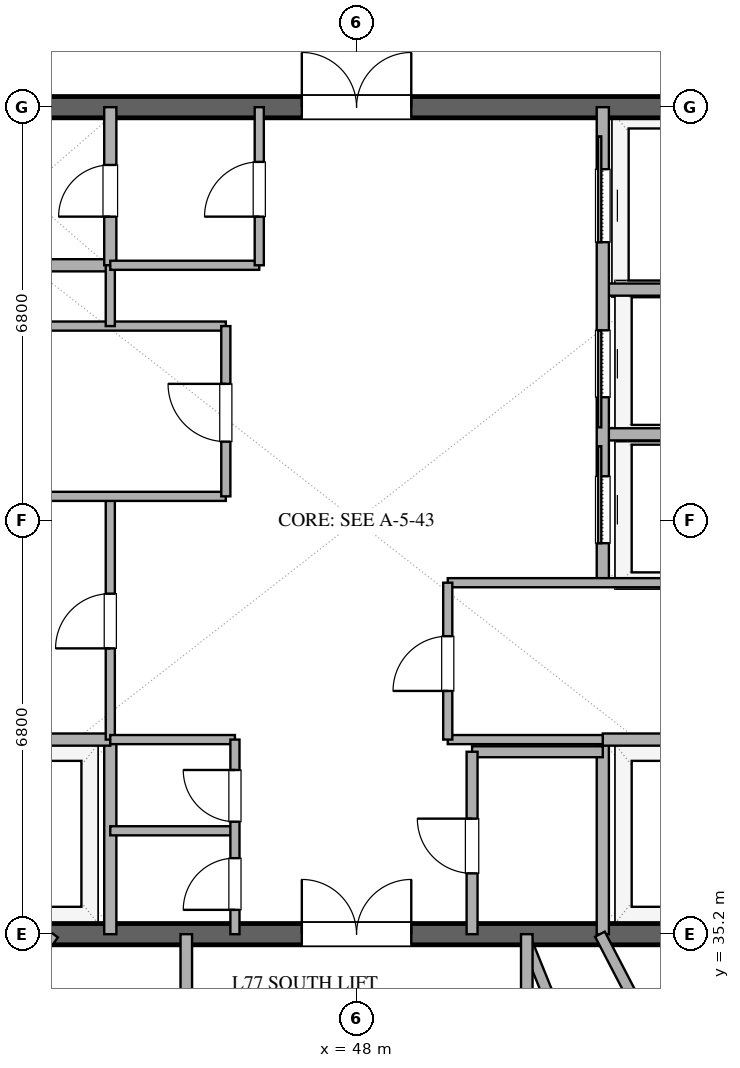
"""IFC4 building model, lengths in metres.
Left out: names, types, materials, properties, quantities, classifications, styles, units other than length and angle.
Written with IfcOpenShell. Run it as: python <this file> out.ifc"""

import sys

from ifc_helpers import new_model, si_unit, direction, frame, frame_2d, origin, place, context, subcontext, project, spatial, rectangle, extrude, element, fill, save


model = new_model("IFC4")
c1 = context("Model", 3, precision=1e-05, world=origin(), true_north=direction((0.0, 1.0)))
c2 = subcontext(c1, "Body", "Model", "MODEL_VIEW")
j1 = project(units=[si_unit("LENGTHUNIT", "METRE"), si_unit("PLANEANGLEUNIT", "RADIAN")], contexts=[c1])
p1 = place(None, origin())
s1 = spatial("IfcSite", under=j1, at=p1, CompositionType="ELEMENT")
p2 = place(p1, origin())
s2 = spatial("IfcBuilding", under=s1, at=p2, CompositionType="ELEMENT")
p3 = place(p2, frame((0.0, 0.0, 298.2)))
s3 = spatial("IfcBuildingStorey", under=s2, at=p3, CompositionType="ELEMENT", Elevation=298.2)
p4 = place(p3, frame((41.0, 35.2, 0.0), z_axis=(0.0, 0.0, 1.0), x_axis=(1.0, 0.0, 0.0)))
e1 = element("IfcWall", 1, at=p4, inside=s3, PredefinedType="SHEAR", context=c2, shape_type="SweptSolid", body=[
    extrude(rectangle(XDim=14.0, YDim=0.35, at=frame_2d((7.0, 0.0))), origin(), (0.0, 0.0, 1.0), 3.37),
])
p5 = place(p4, frame((6.1, 0.0, 0.0)))
e2 = element("IfcOpeningElement", 2, at=p5, cuts=e1, PredefinedType="OPENING", context=c2, shape_type="SweptSolid", body=[
    extrude(rectangle(XDim=1.8, YDim=2.25, at=frame_2d((0.9, 1.125))), frame((0.0, 0.185, 0.0), z_axis=(0.0, -1.0, 0.0), x_axis=(1.0, 0.0, 0.0)), (0.0, 0.0, 1.0), 0.37),
])
p6 = place(p3, frame((41.0, 48.8, 0.0), z_axis=(0.0, 0.0, 1.0), x_axis=(1.0, 0.0, 0.0)))
e3 = element("IfcWall", 3, at=p6, inside=s3, PredefinedType="SHEAR", context=c2, shape_type="SweptSolid", body=[
    extrude(rectangle(XDim=14.0, YDim=0.35, at=frame_2d((7.0, 0.0))), origin(), (0.0, 0.0, 1.0), 3.37),
])
p7 = place(p6, frame((6.1, 0.0, 0.0)))
e4 = element("IfcOpeningElement", 4, at=p7, cuts=e3, PredefinedType="OPENING", context=c2, shape_type="SweptSolid", body=[
    extrude(rectangle(XDim=1.8, YDim=2.25, at=frame_2d((0.9, 1.125))), frame((0.0, 0.185, 0.0), z_axis=(0.0, -1.0, 0.0), x_axis=(1.0, 0.0, 0.0)), (0.0, 0.0, 1.0), 0.37),
])
p8 = place(p3, frame((43.95, 35.2, 0.0), z_axis=(0.0, 0.0, 1.0), x_axis=(0.0, 1.0, 0.0)))
e5 = element("IfcWall", 5, at=p8, inside=s3, PredefinedType="SOLIDWALL", context=c2, shape_type="SweptSolid", body=[
    extrude(rectangle(XDim=3.2, YDim=0.2, at=frame_2d((1.6, 0.0))), origin(), (0.0, 0.0, 1.0), 2.73),
])
p9 = place(p3, frame((41.0, 38.4, 0.0), z_axis=(0.0, 0.0, 1.0), x_axis=(1.0, 0.0, 0.0)))
e6 = element("IfcWall", 6, at=p9, inside=s3, PredefinedType="SOLIDWALL", context=c2, shape_type="SweptSolid", body=[
    extrude(rectangle(XDim=2.95, YDim=0.2, at=frame_2d((1.475, 0.0))), origin(), (0.0, 0.0, 1.0), 2.73),
])
p10 = place(p3, frame((52.05, 35.2, 0.0), z_axis=(0.0, 0.0, 1.0), x_axis=(0.0, 1.0, 0.0)))
e7 = element("IfcWall", 7, at=p10, inside=s3, PredefinedType="SOLIDWALL", context=c2, shape_type="SweptSolid", body=[
    extrude(rectangle(XDim=3.2, YDim=0.2, at=frame_2d((1.6, 0.0))), origin(), (0.0, 0.0, 1.0), 2.73),
])
for number, where, z_axis, x_axis in (
    (8, (52.05, 38.4, 0.0), (0.0, 0.0, 1.0), (1.0, 0.0, 0.0)),
    (9, (41.0, 46.2, 0.0), (0.0, 0.0, 1.0), (1.0, 0.0, 0.0)),
):
    element("IfcWall", number, at=place(p3, frame(where, z_axis=z_axis, x_axis=x_axis)), inside=s3, PredefinedType="SOLIDWALL", context=c2, shape_type="SweptSolid", body=[
        extrude(rectangle(XDim=2.95, YDim=0.2, at=frame_2d((1.475, 0.0))), origin(), (0.0, 0.0, 1.0), 2.73),
    ])
p11 = place(p3, frame((43.95, 46.2, 0.0), z_axis=(0.0, 0.0, 1.0), x_axis=(0.0, 1.0, 0.0)))
e10 = element("IfcWall", 10, at=p11, inside=s3, PredefinedType="SOLIDWALL", context=c2, shape_type="SweptSolid", body=[
    extrude(rectangle(XDim=2.6, YDim=0.2, at=frame_2d((1.3, 0.0))), origin(), (0.0, 0.0, 1.0), 2.73),
])
p12 = place(p11, frame((0.8, 0.0, 0.0)))
e11 = element("IfcOpeningElement", 11, at=p12, cuts=e10, PredefinedType="OPENING", context=c2, shape_type="SweptSolid", body=[
    extrude(rectangle(XDim=0.85, YDim=2.15, at=frame_2d((0.425, 1.075))), frame((0.0, 0.11, 0.0), z_axis=(0.0, -1.0, 0.0), x_axis=(1.0, 0.0, 0.0)), (0.0, 0.0, 1.0), 0.22),
])
p13 = place(p3, frame((43.95, 38.4, 0.0), z_axis=(0.0, 0.0, 1.0), x_axis=(0.0, 1.0, 0.0)))
e12 = element("IfcWall", 12, at=p13, inside=s3, PredefinedType="PARTITIONING", context=c2, shape_type="SweptSolid", body=[
    extrude(rectangle(XDim=4.0, YDim=0.15, at=frame_2d((2.0, 0.0))), origin(), (0.0, 0.0, 1.0), 2.73),
])
p14 = place(p13, frame((1.5, 0.0, 0.0)))
e13 = element("IfcOpeningElement", 13, at=p14, cuts=e12, PredefinedType="OPENING", context=c2, shape_type="SweptSolid", body=[
    extrude(rectangle(XDim=0.9, YDim=2.15, at=frame_2d((0.45, 1.075))), frame((0.0, 0.085, 0.0), z_axis=(0.0, -1.0, 0.0), x_axis=(1.0, 0.0, 0.0)), (0.0, 0.0, 1.0), 0.17),
])
for number, where, z_axis, x_axis in (
    (14, (41.0, 42.4, 0.0), (0.0, 0.0, 1.0), (1.0, 0.0, 0.0)),
    (15, (41.0, 45.2, 0.0), (0.0, 0.0, 1.0), (1.0, 0.0, 0.0)),
):
    element("IfcWall", number, at=place(p3, frame(where, z_axis=z_axis, x_axis=x_axis)), inside=s3, PredefinedType="PARTITIONING", context=c2, shape_type="SweptSolid", body=[
        extrude(rectangle(XDim=4.85, YDim=0.15, at=frame_2d((2.425, 0.0))), origin(), (0.0, 0.0, 1.0), 2.73),
    ])
p15 = place(p3, frame((43.95, 45.2, 0.0), z_axis=(0.0, 0.0, 1.0), x_axis=(0.0, 1.0, 0.0)))
e16 = element("IfcWall", 16, at=p15, inside=s3, PredefinedType="PARTITIONING", context=c2, shape_type="SweptSolid", body=[
    extrude(rectangle(XDim=1.0, YDim=0.15, at=frame_2d((0.5, 0.0))), origin(), (0.0, 0.0, 1.0), 2.73),
])
p16 = place(p3, frame((45.85, 42.4, 0.0), z_axis=(0.0, 0.0, 1.0), x_axis=(0.0, 1.0, 0.0)))
e17 = element("IfcWall", 17, at=p16, inside=s3, PredefinedType="PARTITIONING", context=c2, shape_type="SweptSolid", body=[
    extrude(rectangle(XDim=2.8, YDim=0.15, at=frame_2d((1.4, 0.0))), origin(), (0.0, 0.0, 1.0), 2.73),
])
p17 = place(p16, frame((0.9, 0.0, 0.0)))
e18 = element("IfcOpeningElement", 18, at=p17, cuts=e17, PredefinedType="OPENING", context=c2, shape_type="SweptSolid", body=[
    extrude(rectangle(XDim=0.95, YDim=2.15, at=frame_2d((0.475, 1.075))), frame((0.0, 0.085, 0.0), z_axis=(0.0, -1.0, 0.0), x_axis=(1.0, 0.0, 0.0)), (0.0, 0.0, 1.0), 0.17),
])
for number, where, z_axis, x_axis in (
    (19, (52.05, 43.42, 0.0), (0.0, 0.0, 1.0), (1.0, 0.0, 0.0)),
    (20, (52.05, 45.8, 0.0), (0.0, 0.0, 1.0), (1.0, 0.0, 0.0)),
):
    element("IfcWall", number, at=place(p3, frame(where, z_axis=z_axis, x_axis=x_axis)), inside=s3, PredefinedType="SOLIDWALL", context=c2, shape_type="SweptSolid", body=[
        extrude(rectangle(XDim=2.95, YDim=0.2, at=frame_2d((1.475, 0.0))), origin(), (0.0, 0.0, 1.0), 2.73),
    ])
p18 = place(p3, frame((52.05, 40.98, 0.0), z_axis=(0.0, 0.0, 1.0), x_axis=(0.0, 1.0, 0.0)))
e21 = element("IfcWall", 21, at=p18, inside=s3, PredefinedType="SOLIDWALL", context=c2, shape_type="SweptSolid", body=[
    extrude(rectangle(XDim=7.82, YDim=0.2, at=frame_2d((3.91, 0.0))), origin(), (0.0, 0.0, 1.0), 2.73),
])
p19 = place(p18, frame((0.65, 0.0, 0.0)))
e22 = element("IfcOpeningElement", 22, at=p19, cuts=e21, PredefinedType="OPENING", context=c2, shape_type="SweptSolid", body=[
    extrude(rectangle(XDim=1.1, YDim=2.2, at=frame_2d((0.55, 1.1))), frame((0.0, 0.11, 0.0), z_axis=(0.0, -1.0, 0.0), x_axis=(1.0, 0.0, 0.0)), (0.0, 0.0, 1.0), 0.22),
])
p20 = place(p18, frame((3.05, 0.0, 0.0)))
e23 = element("IfcOpeningElement", 23, at=p20, cuts=e21, PredefinedType="OPENING", context=c2, shape_type="SweptSolid", body=[
    extrude(rectangle(XDim=1.1, YDim=2.2, at=frame_2d((0.55, 1.1))), frame((0.0, 0.11, 0.0), z_axis=(0.0, -1.0, 0.0), x_axis=(1.0, 0.0, 0.0)), (0.0, 0.0, 1.0), 0.22),
])
p21 = place(p18, frame((5.6, 0.0, 0.0)))
e24 = element("IfcOpeningElement", 24, at=p21, cuts=e21, PredefinedType="OPENING", context=c2, shape_type="SweptSolid", body=[
    extrude(rectangle(XDim=1.2, YDim=2.2, at=frame_2d((0.6, 1.1))), frame((0.0, 0.11, 0.0), z_axis=(0.0, -1.0, 0.0), x_axis=(1.0, 0.0, 0.0)), (0.0, 0.0, 1.0), 0.22),
])
p22 = place(p3, frame((49.5, 40.98, 0.0), z_axis=(0.0, 0.0, 1.0), x_axis=(1.0, 0.0, 0.0)))
e25 = element("IfcWall", 25, at=p22, inside=s3, PredefinedType="PARTITIONING", context=c2, shape_type="SweptSolid", body=[
    extrude(rectangle(XDim=5.5, YDim=0.15, at=frame_2d((2.75, 0.0))), origin(), (0.0, 0.0, 1.0), 2.73),
])
p23 = place(p3, frame((49.5, 38.4, 0.0), z_axis=(0.0, 0.0, 1.0), x_axis=(1.0, 0.0, 0.0)))
e26 = element("IfcWall", 26, at=p23, inside=s3, PredefinedType="PARTITIONING", context=c2, shape_type="SweptSolid", body=[
    extrude(rectangle(XDim=2.55, YDim=0.15, at=frame_2d((1.275, 0.0))), origin(), (0.0, 0.0, 1.0), 2.73),
])
p24 = place(p3, frame((49.5, 38.4, 0.0), z_axis=(0.0, 0.0, 1.0), x_axis=(0.0, 1.0, 0.0)))
e27 = element("IfcWall", 27, at=p24, inside=s3, PredefinedType="PARTITIONING", context=c2, shape_type="SweptSolid", body=[
    extrude(rectangle(XDim=2.58, YDim=0.15, at=frame_2d((1.29, 0.0))), origin(), (0.0, 0.0, 1.0), 2.73),
])
p25 = place(p24, frame((0.8, 0.0, 0.0)))
e28 = element("IfcOpeningElement", 28, at=p25, cuts=e27, PredefinedType="OPENING", context=c2, shape_type="SweptSolid", body=[
    extrude(rectangle(XDim=0.9, YDim=2.15, at=frame_2d((0.45, 1.075))), frame((0.0, 0.085, 0.0), z_axis=(0.0, -1.0, 0.0), x_axis=(1.0, 0.0, 0.0)), (0.0, 0.0, 1.0), 0.17),
])
for number, where, z_axis, x_axis in (
    (29, (43.95, 36.9, 0.0), (0.0, 0.0, 1.0), (1.0, 0.0, 0.0)),
    (30, (43.95, 38.4, 0.0), (0.0, 0.0, 1.0), (1.0, 0.0, 0.0)),
):
    element("IfcWall", number, at=place(p3, frame(where, z_axis=z_axis, x_axis=x_axis)), inside=s3, PredefinedType="PARTITIONING", context=c2, shape_type="SweptSolid", body=[
        extrude(rectangle(XDim=2.05, YDim=0.15, at=frame_2d((1.025, 0.0))), origin(), (0.0, 0.0, 1.0), 2.73),
    ])
p26 = place(p3, frame((46.0, 35.2, 0.0), z_axis=(0.0, 0.0, 1.0), x_axis=(0.0, 1.0, 0.0)))
e31 = element("IfcWall", 31, at=p26, inside=s3, PredefinedType="PARTITIONING", context=c2, shape_type="SweptSolid", body=[
    extrude(rectangle(XDim=3.2, YDim=0.15, at=frame_2d((1.6, 0.0))), origin(), (0.0, 0.0, 1.0), 2.73),
])
p27 = place(p26, frame((0.4, 0.0, 0.0)))
e32 = element("IfcOpeningElement", 32, at=p27, cuts=e31, PredefinedType="OPENING", context=c2, shape_type="SweptSolid", body=[
    extrude(rectangle(XDim=0.85, YDim=2.15, at=frame_2d((0.425, 1.075))), frame((0.0, 0.085, 0.0), z_axis=(0.0, -1.0, 0.0), x_axis=(1.0, 0.0, 0.0)), (0.0, 0.0, 1.0), 0.17),
])
p28 = place(p26, frame((1.85, 0.0, 0.0)))
e33 = element("IfcOpeningElement", 33, at=p28, cuts=e31, PredefinedType="OPENING", context=c2, shape_type="SweptSolid", body=[
    extrude(rectangle(XDim=0.85, YDim=2.15, at=frame_2d((0.425, 1.075))), frame((0.0, 0.085, 0.0), z_axis=(0.0, -1.0, 0.0), x_axis=(1.0, 0.0, 0.0)), (0.0, 0.0, 1.0), 0.17),
])
p29 = place(p3, frame((43.95, 46.2, 0.0), z_axis=(0.0, 0.0, 1.0), x_axis=(1.0, 0.0, 0.0)))
e34 = element("IfcWall", 34, at=p29, inside=s3, PredefinedType="PARTITIONING", context=c2, shape_type="SweptSolid", body=[
    extrude(rectangle(XDim=2.45, YDim=0.15, at=frame_2d((1.225, 0.0))), origin(), (0.0, 0.0, 1.0), 2.73),
])
p30 = place(p3, frame((46.4, 46.2, 0.0), z_axis=(0.0, 0.0, 1.0), x_axis=(0.0, 1.0, 0.0)))
e35 = element("IfcWall", 35, at=p30, inside=s3, PredefinedType="PARTITIONING", context=c2, shape_type="SweptSolid", body=[
    extrude(rectangle(XDim=2.6, YDim=0.15, at=frame_2d((1.3, 0.0))), origin(), (0.0, 0.0, 1.0), 2.73),
])
p31 = place(p30, frame((0.8, 0.0, 0.0)))
e36 = element("IfcOpeningElement", 36, at=p31, cuts=e35, PredefinedType="OPENING", context=c2, shape_type="SweptSolid", body=[
    extrude(rectangle(XDim=0.9, YDim=2.15, at=frame_2d((0.45, 1.075))), frame((0.0, 0.085, 0.0), z_axis=(0.0, -1.0, 0.0), x_axis=(1.0, 0.0, 0.0)), (0.0, 0.0, 1.0), 0.17),
])
p32 = place(p3, frame((49.9, 38.2, 0.0), z_axis=(0.0, 0.0, 1.0), x_axis=(1.0, 0.0, 0.0)))
e37 = element("IfcWall", 37, at=p32, inside=s3, PredefinedType="PLUMBINGWALL", context=c2, shape_type="SweptSolid", body=[
    extrude(rectangle(XDim=2.15, YDim=0.18, at=frame_2d((1.075, 0.0))), origin(), (0.0, 0.0, 1.0), 2.73),
])
p33 = place(p3, frame((49.9, 35.2, 0.0), z_axis=(0.0, 0.0, 1.0), x_axis=(0.0, 1.0, 0.0)))
e38 = element("IfcWall", 38, at=p33, inside=s3, PredefinedType="PLUMBINGWALL", context=c2, shape_type="SweptSolid", body=[
    extrude(rectangle(XDim=3.0, YDim=0.18, at=frame_2d((1.5, 0.0))), origin(), (0.0, 0.0, 1.0), 2.73),
])
p34 = place(p33, frame((1.0, 0.0, 0.0)))
e39 = element("IfcOpeningElement", 39, at=p34, cuts=e38, PredefinedType="OPENING", context=c2, shape_type="SweptSolid", body=[
    extrude(rectangle(XDim=0.9, YDim=2.1, at=frame_2d((0.45, 1.05))), frame((0.0, 0.1, 0.0), z_axis=(0.0, -1.0, 0.0), x_axis=(1.0, 0.0, 0.0)), (0.0, 0.0, 1.0), 0.2),
])
p35 = place(p3, frame((55.736, 28.027, 0.0), z_axis=(0.0, 0.0, 1.0), x_axis=(-0.461598928477, 0.88708873808, 0.0)))
e40 = element("IfcWall", 40, at=p35, inside=s3, PredefinedType="PLUMBINGWALL", context=c2, shape_type="SweptSolid", body=[
    extrude(rectangle(XDim=8.086, YDim=0.18, at=frame_2d((4.043, 0.0))), origin(), (0.0, 0.0, 1.0), 2.73),
])
p36 = place(p35, frame((3.618, 0.0, 0.0)))
e41 = element("IfcOpeningElement", 41, at=p36, cuts=e40, PredefinedType="OPENING", context=c2, shape_type="SweptSolid", body=[
    extrude(rectangle(XDim=0.85, YDim=2.1, at=frame_2d((0.425, 1.05))), frame((0.0, 0.1, 0.0), z_axis=(0.0, -1.0, 0.0), x_axis=(1.0, 0.0, 0.0)), (0.0, 0.0, 1.0), 0.2),
])
p37 = place(p3, frame((50.8, 35.07, 0.0), z_axis=(0.0, 0.0, 1.0), x_axis=(0.374600990238, -0.927186118378, 0.0)))
e42 = element("IfcWall", 42, at=p37, inside=s3, PredefinedType="PLUMBINGWALL", context=c2, shape_type="SweptSolid", body=[
    extrude(rectangle(XDim=7.901, YDim=0.18, at=frame_2d((3.95, 0.0))), origin(), (0.0, 0.0, 1.0), 2.73),
])
p38 = place(p3, frame((40.259, 31.439, 0.0), z_axis=(0.0, 0.0, 1.0), x_axis=(0.591168457908, 0.806548110391, 0.0)))
e43 = element("IfcWall", 43, at=p38, inside=s3, PredefinedType="PLUMBINGWALL", context=c2, shape_type="SweptSolid", body=[
    extrude(rectangle(XDim=4.663, YDim=0.18, at=frame_2d((2.332, 0.0))), origin(), (0.0, 0.0, 1.0), 2.73),
])
p39 = place(p38, frame((1.907, 0.0, 0.0)))
e44 = element("IfcOpeningElement", 44, at=p39, cuts=e43, PredefinedType="OPENING", context=c2, shape_type="SweptSolid", body=[
    extrude(rectangle(XDim=0.85, YDim=2.1, at=frame_2d((0.425, 1.05))), frame((0.0, 0.1, 0.0), z_axis=(0.0, -1.0, 0.0), x_axis=(1.0, 0.0, 0.0)), (0.0, 0.0, 1.0), 0.2),
])
for number, where, z_axis, x_axis in (
    (45, (45.2, 33.1, 0.0), (0.0, 0.0, 1.0), (0.0, 1.0, 0.0)),
    (46, (50.8, 35.2, 0.0), (0.0, 0.0, 1.0), (0.0, -1.0, 0.0)),
):
    element("IfcWall", number, at=place(p3, frame(where, z_axis=z_axis, x_axis=x_axis)), inside=s3, PredefinedType="PARTITIONING", context=c2, shape_type="SweptSolid", body=[
        extrude(rectangle(XDim=2.1, YDim=0.19, at=frame_2d((1.05, 0.0))), origin(), (0.0, 0.0, 1.0), 2.73),
    ])
p40 = place(p5, origin())
e47 = element("IfcDoor", 47, at=p40, inside=s3, OperationType="DOUBLE_DOOR_SINGLE_SWING", PredefinedType="DOOR", context=c2, shape_type="SweptSolid", body=[
    extrude(rectangle(XDim=1.8, YDim=2.25, at=frame_2d((0.9, 1.125))), frame((0.0, 0.025, 0.0), z_axis=(0.0, -1.0, 0.0), x_axis=(1.0, 0.0, 0.0)), (0.0, 0.0, 1.0), 0.05),
])
fill(e2, e47)
p41 = place(p7, origin())
e48 = element("IfcDoor", 48, at=p41, inside=s3, OperationType="DOUBLE_DOOR_SINGLE_SWING", PredefinedType="DOOR", context=c2, shape_type="SweptSolid", body=[
    extrude(rectangle(XDim=1.8, YDim=2.25, at=frame_2d((0.9, 1.125))), frame((0.0, 0.025, 0.0), z_axis=(0.0, -1.0, 0.0), x_axis=(1.0, 0.0, 0.0)), (0.0, 0.0, 1.0), 0.05),
])
fill(e4, e48)
p42 = place(p12, origin())
e49 = element("IfcDoor", 49, at=p42, inside=s3, OperationType="SINGLE_SWING_LEFT", PredefinedType="DOOR", context=c2, shape_type="SweptSolid", body=[
    extrude(rectangle(XDim=0.85, YDim=2.15, at=frame_2d((0.425, 1.075))), frame((0.0, 0.025, 0.0), z_axis=(0.0, -1.0, 0.0), x_axis=(1.0, 0.0, 0.0)), (0.0, 0.0, 1.0), 0.05),
])
fill(e11, e49)
p43 = place(p14, origin())
e50 = element("IfcDoor", 50, at=p43, inside=s3, OperationType="SINGLE_SWING_LEFT", PredefinedType="DOOR", context=c2, shape_type="SweptSolid", body=[
    extrude(rectangle(XDim=0.9, YDim=2.15, at=frame_2d((0.45, 1.075))), frame((0.0, 0.025, 0.0), z_axis=(0.0, -1.0, 0.0), x_axis=(1.0, 0.0, 0.0)), (0.0, 0.0, 1.0), 0.05),
])
fill(e13, e50)
p44 = place(p17, origin())
e51 = element("IfcDoor", 51, at=p44, inside=s3, OperationType="SINGLE_SWING_RIGHT", PredefinedType="DOOR", context=c2, shape_type="SweptSolid", body=[
    extrude(rectangle(XDim=0.95, YDim=2.15, at=frame_2d((0.475, 1.075))), frame((0.0, 0.025, 0.0), z_axis=(0.0, -1.0, 0.0), x_axis=(1.0, 0.0, 0.0)), (0.0, 0.0, 1.0), 0.05),
])
fill(e18, e51)
p45 = place(p19, origin())
e52 = element("IfcDoor", 52, at=p45, inside=s3, OperationType="SLIDING_TO_RIGHT", PredefinedType="DOOR", context=c2, shape_type="SweptSolid", body=[
    extrude(rectangle(XDim=1.1, YDim=2.2, at=frame_2d((0.55, 1.1))), frame((0.0, 0.025, 0.0), z_axis=(0.0, -1.0, 0.0), x_axis=(1.0, 0.0, 0.0)), (0.0, 0.0, 1.0), 0.05),
])
fill(e22, e52)
p46 = place(p20, origin())
e53 = element("IfcDoor", 53, at=p46, inside=s3, OperationType="SLIDING_TO_LEFT", PredefinedType="DOOR", context=c2, shape_type="SweptSolid", body=[
    extrude(rectangle(XDim=1.1, YDim=2.2, at=frame_2d((0.55, 1.1))), frame((0.0, 0.025, 0.0), z_axis=(0.0, -1.0, 0.0), x_axis=(1.0, 0.0, 0.0)), (0.0, 0.0, 1.0), 0.05),
])
fill(e23, e53)
p47 = place(p21, origin())
e54 = element("IfcDoor", 54, at=p47, inside=s3, OperationType="SLIDING_TO_RIGHT", PredefinedType="DOOR", context=c2, shape_type="SweptSolid", body=[
    extrude(rectangle(XDim=1.2, YDim=2.2, at=frame_2d((0.6, 1.1))), frame((0.0, 0.025, 0.0), z_axis=(0.0, -1.0, 0.0), x_axis=(1.0, 0.0, 0.0)), (0.0, 0.0, 1.0), 0.05),
])
fill(e24, e54)
p48 = place(p25, origin())
e55 = element("IfcDoor", 55, at=p48, inside=s3, OperationType="SINGLE_SWING_LEFT", PredefinedType="DOOR", context=c2, shape_type="SweptSolid", body=[
    extrude(rectangle(XDim=0.9, YDim=2.15, at=frame_2d((0.45, 1.075))), frame((0.0, 0.025, 0.0), z_axis=(0.0, -1.0, 0.0), x_axis=(1.0, 0.0, 0.0)), (0.0, 0.0, 1.0), 0.05),
])
fill(e28, e55)
p49 = place(p27, origin())
e56 = element("IfcDoor", 56, at=p49, inside=s3, OperationType="SINGLE_SWING_LEFT", PredefinedType="DOOR", context=c2, shape_type="SweptSolid", body=[
    extrude(rectangle(XDim=0.85, YDim=2.15, at=frame_2d((0.425, 1.075))), frame((0.0, 0.025, 0.0), z_axis=(0.0, -1.0, 0.0), x_axis=(1.0, 0.0, 0.0)), (0.0, 0.0, 1.0), 0.05),
])
fill(e32, e56)
p50 = place(p28, origin())
e57 = element("IfcDoor", 57, at=p50, inside=s3, OperationType="SINGLE_SWING_RIGHT", PredefinedType="DOOR", context=c2, shape_type="SweptSolid", body=[
    extrude(rectangle(XDim=0.85, YDim=2.15, at=frame_2d((0.425, 1.075))), frame((0.0, 0.025, 0.0), z_axis=(0.0, -1.0, 0.0), x_axis=(1.0, 0.0, 0.0)), (0.0, 0.0, 1.0), 0.05),
])
fill(e33, e57)
p51 = place(p31, origin())
e58 = element("IfcDoor", 58, at=p51, inside=s3, OperationType="SINGLE_SWING_LEFT", PredefinedType="DOOR", context=c2, shape_type="SweptSolid", body=[
    extrude(rectangle(XDim=0.9, YDim=2.15, at=frame_2d((0.45, 1.075))), frame((0.0, 0.025, 0.0), z_axis=(0.0, -1.0, 0.0), x_axis=(1.0, 0.0, 0.0)), (0.0, 0.0, 1.0), 0.05),
])
fill(e36, e58)
p52 = place(p34, origin())
e59 = element("IfcDoor", 59, at=p52, inside=s3, OperationType="SINGLE_SWING_RIGHT", PredefinedType="DOOR", context=c2, shape_type="SweptSolid", body=[
    extrude(rectangle(XDim=0.9, YDim=2.1, at=frame_2d((0.45, 1.05))), frame((0.0, 0.025, 0.0), z_axis=(0.0, -1.0, 0.0), x_axis=(1.0, 0.0, 0.0)), (0.0, 0.0, 1.0), 0.05),
])
fill(e39, e59)
save(model, sys.argv[1])
